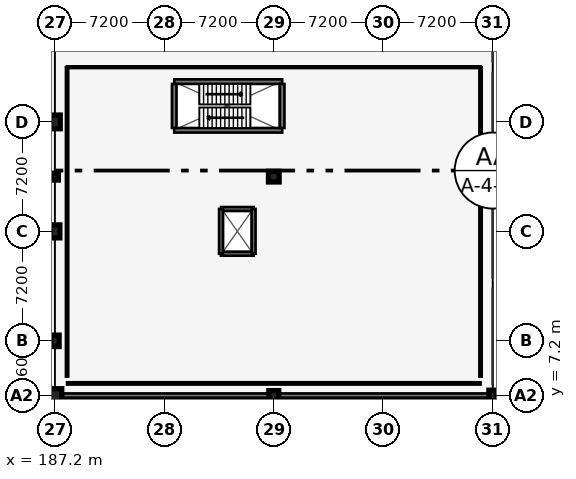
"""IFC4 building model, lengths in metres.
Left out: names, types, materials, properties, quantities, classifications, styles, units other than length and angle.
Written with IfcOpenShell. Run it as: python <this file> out.ifc"""

import sys

from ifc_helpers import new_model, si_unit, direction, frame, frame_2d, origin, origin_2d, place, context, subcontext, project, spatial, rectangle, circle, extrude, element, fill, save


model = new_model("IFC4")
c1 = context("Model", 3, precision=1e-05, world=origin(), true_north=direction((0.0, 1.0)))
c2 = subcontext(c1, "Body", "Model", "MODEL_VIEW")
j1 = project(units=[si_unit("LENGTHUNIT", "METRE"), si_unit("PLANEANGLEUNIT", "RADIAN")], contexts=[c1])
p1 = place(None, origin())
s1 = spatial("IfcSite", under=j1, at=p1, CompositionType="ELEMENT")
p2 = place(p1, origin())
s2 = spatial("IfcBuilding", under=s1, at=p2, CompositionType="ELEMENT")
p3 = place(p2, frame((0.0, 0.0, 4.8)))
s3 = spatial("IfcBuildingStorey", under=s2, at=p3, CompositionType="ELEMENT", Elevation=4.8)
p4 = place(p3, frame((187.2, 7.2, 0.0), z_axis=(0.0, 0.0, 1.0), x_axis=(1.0, 0.0, 0.0)))
e1 = element("IfcColumn", 1, at=p4, inside=s3, PredefinedType="COLUMN", context=c2, shape_type="SweptSolid", body=[
    extrude(circle(Radius=0.45, at=origin_2d()), origin(), (0.0, 0.0, 1.0), 4.2),
])
p5 = place(p3, frame((187.2, 10.8, 0.0), z_axis=(0.0, 0.0, 1.0), x_axis=(1.0, 0.0, 0.0)))
e2 = element("IfcColumn", 2, at=p5, inside=s3, PredefinedType="COLUMN", context=c2, shape_type="SweptSolid", body=[
    extrude(rectangle(XDim=0.55, YDim=0.75, at=origin_2d()), origin(), (0.0, 0.0, 1.0), 4.2),
])
p6 = place(p3, frame((187.2, 18.0, 0.0), z_axis=(0.0, 0.0, 1.0), x_axis=(1.0, 0.0, 0.0)))
e3 = element("IfcColumn", 3, at=p6, inside=s3, PredefinedType="COLUMN", context=c2, shape_type="SweptSolid", body=[
    extrude(rectangle(XDim=0.65, YDim=0.85, at=origin_2d()), origin(), (0.0, 0.0, 1.0), 4.2),
])
p7 = place(p3, frame((187.2, 21.6, 0.0), z_axis=(0.0, 0.0, 1.0), x_axis=(1.0, 0.0, 0.0)))
e4 = element("IfcColumn", 4, at=p7, inside=s3, PredefinedType="COLUMN", context=c2, shape_type="SweptSolid", body=[
    extrude(rectangle(XDim=0.45, YDim=0.45, at=origin_2d()), origin(), (0.0, 0.0, 1.0), 4.2),
])
p8 = place(p3, frame((187.2, 25.2, 0.0), z_axis=(0.0, 0.0, 1.0), x_axis=(1.0, 0.0, 0.0)))
e5 = element("IfcColumn", 5, at=p8, inside=s3, PredefinedType="COLUMN", context=c2, shape_type="SweptSolid", body=[
    extrude(rectangle(XDim=0.7, YDim=0.9, at=origin_2d()), origin(), (0.0, 0.0, 1.0), 4.2),
])
p9 = place(p3, frame((201.6, 7.2, 0.0), z_axis=(0.0, 0.0, 1.0), x_axis=(1.0, 0.0, 0.0)))
e6 = element("IfcColumn", 6, at=p9, inside=s3, PredefinedType="COLUMN", context=c2, shape_type="SweptSolid", body=[
    extrude(rectangle(XDim=0.65, YDim=0.65, at=origin_2d()), origin(), (0.0, 0.0, 1.0), 4.2),
])
p10 = place(p3, frame((201.6, 21.6, 0.0), z_axis=(0.0, 0.0, 1.0), x_axis=(1.0, 0.0, 0.0)))
e7 = element("IfcColumn", 7, at=p10, inside=s3, PredefinedType="COLUMN", context=c2, shape_type="SweptSolid", body=[
    extrude(rectangle(XDim=0.7, YDim=0.7, at=origin_2d()), origin(), (0.0, 0.0, 1.0), 4.2),
])
for number, where, z_axis, x_axis in (
    (8, (216.0, 7.2, 0.0), (0.0, 0.0, 1.0), (1.0, 0.0, 0.0)),
    (9, (216.0, 21.6, 0.0), (0.0, 0.0, 1.0), (1.0, 0.0, 0.0)),
):
    element("IfcColumn", number, at=place(p3, frame(where, z_axis=z_axis, x_axis=x_axis)), inside=s3, PredefinedType="COLUMN", context=c2, shape_type="SweptSolid", body=[
        extrude(rectangle(XDim=0.5, YDim=0.7, at=origin_2d()), origin(), (0.0, 0.0, 1.0), 4.2),
    ])
p11 = place(p3, frame((108.0, 10.8, 0.0), z_axis=(0.0, 0.0, 1.0), x_axis=(1.0, 0.0, 0.0)))
e10 = element("IfcWall", 10, at=p11, inside=s3, PredefinedType="SOLIDWALL", context=c2, shape_type="SweptSolid", body=[
    extrude(rectangle(XDim=79.2, YDim=0.3, at=frame_2d((39.6, 0.0))), origin(), (0.0, 0.0, 1.0), 2.872),
])
p12 = place(p3, frame((187.2, 7.2, 0.0), z_axis=(0.0, 0.0, 1.0), x_axis=(1.0, 0.0, 0.0)))
e11 = element("IfcWall", 11, at=p12, inside=s3, PredefinedType="SOLIDWALL", context=c2, shape_type="SweptSolid", body=[
    extrude(rectangle(XDim=28.8, YDim=0.28, at=frame_2d((14.4, 0.0))), origin(), (0.0, 0.0, 1.0), 3.058),
])
p13 = place(p12, frame((2.2, 0.0, 0.72)))
e12 = element("IfcOpeningElement", 12, at=p13, cuts=e11, PredefinedType="OPENING", context=c2, shape_type="SweptSolid", body=[
    extrude(rectangle(XDim=1.65, YDim=2.1, at=frame_2d((0.825, 1.05))), frame((0.0, 0.15, 0.0), z_axis=(0.0, -1.0, 0.0), x_axis=(1.0, 0.0, 0.0)), (0.0, 0.0, 1.0), 0.3),
])
p14 = place(p12, frame((9.4, 0.0, 0.72)))
e13 = element("IfcOpeningElement", 13, at=p14, cuts=e11, PredefinedType="OPENING", context=c2, shape_type="SweptSolid", body=[
    extrude(rectangle(XDim=1.8, YDim=2.15, at=frame_2d((0.9, 1.075))), frame((0.0, 0.15, 0.0), z_axis=(0.0, -1.0, 0.0), x_axis=(1.0, 0.0, 0.0)), (0.0, 0.0, 1.0), 0.3),
])
p15 = place(p12, frame((16.6, 0.0, 0.72)))
e14 = element("IfcOpeningElement", 14, at=p15, cuts=e11, PredefinedType="OPENING", context=c2, shape_type="SweptSolid", body=[
    extrude(rectangle(XDim=1.2, YDim=2.0, at=frame_2d((0.6, 1.0))), frame((0.0, 0.15, 0.0), z_axis=(0.0, -1.0, 0.0), x_axis=(1.0, 0.0, 0.0)), (0.0, 0.0, 1.0), 0.3),
])
p16 = place(p3, frame((195.05, 24.65, 0.0), z_axis=(0.0, 0.0, 1.0), x_axis=(1.0, 0.0, 0.0)))
e15 = element("IfcWall", 15, at=p16, inside=s3, PredefinedType="SHEAR", context=c2, shape_type="SweptSolid", body=[
    extrude(rectangle(XDim=7.1, YDim=0.3, at=frame_2d((3.55, 0.0))), origin(), (0.0, 0.0, 1.0), 3.45),
])
p17 = place(p3, frame((202.15, 27.85, 0.0), z_axis=(0.0, 0.0, 1.0), x_axis=(-1.0, 0.0, 0.0)))
e16 = element("IfcWall", 16, at=p17, inside=s3, PredefinedType="SHEAR", context=c2, shape_type="SweptSolid", body=[
    extrude(rectangle(XDim=7.1, YDim=0.3, at=frame_2d((3.55, 0.0))), origin(), (0.0, 0.0, 1.0), 3.45),
])
p18 = place(p17, frame((5.6, 0.0, 0.0)))
e17 = element("IfcOpeningElement", 17, at=p18, cuts=e16, PredefinedType="OPENING", context=c2, shape_type="SweptSolid", body=[
    extrude(rectangle(XDim=1.07, YDim=2.15, at=frame_2d((0.535, 1.075))), frame((0.0, 0.16, 0.0), z_axis=(0.0, -1.0, 0.0), x_axis=(1.0, 0.0, 0.0)), (0.0, 0.0, 1.0), 0.32),
])
for number, where, z_axis, x_axis in (
    (18, (202.15, 24.8, 0.0), (0.0, 0.0, 1.0), (0.0, 1.0, 0.0)),
    (19, (195.05, 27.7, 0.0), (0.0, 0.0, 1.0), (0.0, -1.0, 0.0)),
):
    element("IfcWall", number, at=place(p3, frame(where, z_axis=z_axis, x_axis=x_axis)), inside=s3, PredefinedType="SHEAR", context=c2, shape_type="SweptSolid", body=[
        extrude(rectangle(XDim=2.9, YDim=0.3, at=frame_2d((1.45, 0.0))), origin(), (0.0, 0.0, 1.0), 3.45),
    ])
p19 = place(p3, frame((198.125, 16.525, 0.0), z_axis=(0.0, 0.0, 1.0), x_axis=(1.0, 0.0, 0.0)))
e20 = element("IfcWall", 20, at=p19, inside=s3, PredefinedType="SHEAR", context=c2, shape_type="SweptSolid", body=[
    extrude(rectangle(XDim=2.15, YDim=0.25, at=frame_2d((1.075, 0.0))), origin(), (0.0, 0.0, 1.0), 3.55),
])
p20 = place(p3, frame((200.275, 19.475, 0.0), z_axis=(0.0, 0.0, 1.0), x_axis=(-1.0, 0.0, 0.0)))
e21 = element("IfcWall", 21, at=p20, inside=s3, PredefinedType="SHEAR", context=c2, shape_type="SweptSolid", body=[
    extrude(rectangle(XDim=2.15, YDim=0.25, at=frame_2d((1.075, 0.0))), origin(), (0.0, 0.0, 1.0), 3.55),
])
p21 = place(p20, frame((0.525, 0.0, 0.0)))
e22 = element("IfcOpeningElement", 22, at=p21, cuts=e21, PredefinedType="OPENING", context=c2, shape_type="SweptSolid", body=[
    extrude(rectangle(XDim=1.1, YDim=2.15, at=frame_2d((0.55, 1.075))), frame((0.0, 0.135, 0.0), z_axis=(0.0, -1.0, 0.0), x_axis=(1.0, 0.0, 0.0)), (0.0, 0.0, 1.0), 0.27),
])
for number, where, z_axis, x_axis in (
    (23, (198.125, 19.475, 0.0), (0.0, 0.0, 1.0), (0.0, -1.0, 0.0)),
    (24, (200.275, 16.525, 0.0), (0.0, 0.0, 1.0), (0.0, 1.0, 0.0)),
):
    element("IfcWall", number, at=place(p3, frame(where, z_axis=z_axis, x_axis=x_axis)), inside=s3, PredefinedType="SHEAR", context=c2, shape_type="SweptSolid", body=[
        extrude(rectangle(XDim=2.95, YDim=0.25, at=frame_2d((1.475, 0.0))), origin(), (0.0, 0.0, 1.0), 3.55),
    ])
p22 = place(p3, frame((215.2, 8.0, 0.0), z_axis=(0.0, 0.0, 1.0), x_axis=(-1.0, 0.0, 0.0)))
e25 = element("IfcWall", 25, at=p22, inside=s3, PredefinedType="PARTITIONING", context=c2, shape_type="SweptSolid", body=[
    extrude(rectangle(XDim=27.2, YDim=0.15, at=frame_2d((13.6, 0.0))), origin(), (0.0, 0.0, 1.0), 3.6),
])
for number, where, z_axis, x_axis in (
    (26, (215.2, 8.45, 0.0), (0.0, 0.0, 1.0), (0.0, 1.0, 0.0)),
    (27, (188.0, 28.8, 0.0), (0.0, 0.0, 1.0), (0.0, -1.0, 0.0)),
):
    element("IfcWall", number, at=place(p3, frame(where, z_axis=z_axis, x_axis=x_axis)), inside=s3, PredefinedType="PARTITIONING", context=c2, shape_type="SweptSolid", body=[
        extrude(rectangle(XDim=20.35, YDim=0.15, at=frame_2d((10.175, 0.0))), origin(), (0.0, 0.0, 1.0), 2.979),
    ])
p23 = place(p3, frame((188.0, 28.8, 0.0), z_axis=(0.0, 0.0, 1.0), x_axis=(1.0, 0.0, 0.0)))
e28 = element("IfcWall", 28, at=p23, inside=s3, PredefinedType="PARTITIONING", context=c2, shape_type="SweptSolid", body=[
    extrude(rectangle(XDim=27.2, YDim=0.11, at=frame_2d((13.6, 0.0))), origin(), (0.0, 0.0, 1.0), 3.6),
])
p24 = place(p23, frame((12.7, 0.0, 0.0)))
e29 = element("IfcOpeningElement", 29, at=p24, cuts=e28, PredefinedType="OPENING", context=c2, shape_type="SweptSolid", body=[
    extrude(rectangle(XDim=1.8, YDim=2.2, at=frame_2d((0.9, 1.1))), frame((0.0, 0.065, 0.0), z_axis=(0.0, -1.0, 0.0), x_axis=(1.0, 0.0, 0.0)), (0.0, 0.0, 1.0), 0.13),
])
p25 = place(p13, origin())
e30 = element("IfcWindow", 30, at=p25, inside=s3, PartitioningType="SINGLE_PANEL", PredefinedType="WINDOW", context=c2, shape_type="SweptSolid", body=[
    extrude(rectangle(XDim=1.65, YDim=2.1, at=frame_2d((0.825, 1.05))), frame((0.0, 0.03, 0.0), z_axis=(0.0, -1.0, 0.0), x_axis=(1.0, 0.0, 0.0)), (0.0, 0.0, 1.0), 0.06),
])
fill(e12, e30)
p26 = place(p14, origin())
e31 = element("IfcWindow", 31, at=p26, inside=s3, PartitioningType="SINGLE_PANEL", PredefinedType="WINDOW", context=c2, shape_type="SweptSolid", body=[
    extrude(rectangle(XDim=1.8, YDim=2.15, at=frame_2d((0.9, 1.075))), frame((0.0, 0.03, 0.0), z_axis=(0.0, -1.0, 0.0), x_axis=(1.0, 0.0, 0.0)), (0.0, 0.0, 1.0), 0.06),
])
fill(e13, e31)
p27 = place(p15, origin())
e32 = element("IfcWindow", 32, at=p27, inside=s3, PartitioningType="SINGLE_PANEL", PredefinedType="WINDOW", context=c2, shape_type="SweptSolid", body=[
    extrude(rectangle(XDim=1.2, YDim=2.0, at=frame_2d((0.6, 1.0))), frame((0.0, 0.03, 0.0), z_axis=(0.0, -1.0, 0.0), x_axis=(1.0, 0.0, 0.0)), (0.0, 0.0, 1.0), 0.06),
])
fill(e14, e32)
p28 = place(p18, origin())
e33 = element("IfcDoor", 33, at=p28, inside=s3, OperationType="SINGLE_SWING_RIGHT", PredefinedType="DOOR", context=c2, shape_type="SweptSolid", body=[
    extrude(rectangle(XDim=1.07, YDim=2.15, at=frame_2d((0.535, 1.075))), frame((0.0, 0.025, 0.0), z_axis=(0.0, -1.0, 0.0), x_axis=(1.0, 0.0, 0.0)), (0.0, 0.0, 1.0), 0.05),
])
fill(e17, e33)
p29 = place(p21, origin())
e34 = element("IfcDoor", 34, at=p29, inside=s3, OperationType="SLIDING_TO_LEFT", PredefinedType="DOOR", context=c2, shape_type="SweptSolid", body=[
    extrude(rectangle(XDim=1.1, YDim=2.15, at=frame_2d((0.55, 1.075))), frame((0.0, 0.025, 0.0), z_axis=(0.0, -1.0, 0.0), x_axis=(1.0, 0.0, 0.0)), (0.0, 0.0, 1.0), 0.05),
])
fill(e22, e34)
p30 = place(p24, origin())
e35 = element("IfcDoor", 35, at=p30, inside=s3, OperationType="DOUBLE_SWING_RIGHT", PredefinedType="DOOR", context=c2, shape_type="SweptSolid", body=[
    extrude(rectangle(XDim=1.8, YDim=2.2, at=frame_2d((0.9, 1.1))), frame((0.0, 0.025, 0.0), z_axis=(0.0, -1.0, 0.0), x_axis=(1.0, 0.0, 0.0)), (0.0, 0.0, 1.0), 0.05),
])
fill(e29, e35)
save(model, sys.argv[1])
